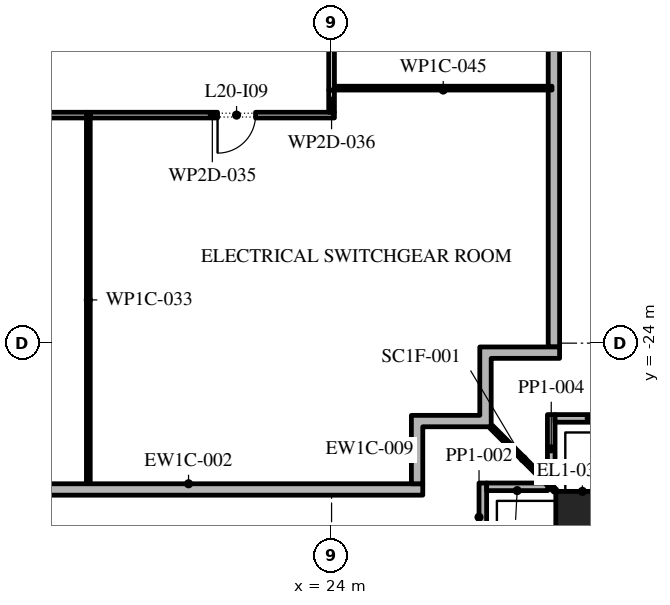
"""IFC4 building model, lengths in metres.
Left out: names, types, materials, properties, quantities, classifications, styles, units other than length and angle.
Written with IfcOpenShell. Run it as: python <this file> out.ifc"""

import sys

from ifc_helpers import new_model, si_unit, direction, frame, frame_2d, origin, origin_2d, place, context, subcontext, project, spatial, polyline, rectangle, outline, extrude, element, fill, save


model = new_model("IFC4")
c1 = context("Model", 3, precision=1e-05, world=origin(), true_north=direction((0.0, 1.0)))
c2 = subcontext(c1, "Body", "Model", "MODEL_VIEW")
j1 = project(units=[si_unit("LENGTHUNIT", "METRE"), si_unit("PLANEANGLEUNIT", "RADIAN")], contexts=[c1])
p1 = place(None, origin())
s1 = spatial("IfcSite", under=j1, at=p1, CompositionType="ELEMENT")
p2 = place(p1, origin())
s2 = spatial("IfcBuilding", under=s1, at=p2, CompositionType="ELEMENT")
p3 = place(p2, frame((0.0, 0.0, 94.2)))
s3 = spatial("IfcBuildingStorey", under=s2, at=p3, CompositionType="ELEMENT", Elevation=94.2)
p4 = place(p3, frame((30.6, -28.6, 0.0), z_axis=(0.0, 0.0, 1.0), x_axis=(1.0, 0.0, 0.0)))
e1 = element("IfcColumn", 1, at=p4, inside=s3, PredefinedType="COLUMN", context=c2, shape_type="SweptSolid", body=[
    extrude(rectangle(XDim=1.4, YDim=1.4, at=origin_2d()), origin(), (0.0, 0.0, 1.0), 5.4),
])
p5 = place(p3, frame((29.85, -24.1, 0.0), z_axis=(0.0, 0.0, 1.0), x_axis=(0.0, 1.0, 0.0)))
e2 = element("IfcWall", 2, at=p5, inside=s3, PredefinedType="STANDARD", context=c2, shape_type="SweptSolid", body=[
    extrude(rectangle(XDim=16.547, YDim=0.3, at=frame_2d((8.273, 0.0))), origin(), (0.0, 0.0, 1.0), 4.95),
])
p6 = place(p3, origin())
e3 = element("IfcWall", 3, at=p6, inside=s3, PredefinedType="STANDARD", context=c2, shape_type="SweptSolid", body=[
    extrude(outline(polyline([(27.9, -25.9), (27.9, -24.1), (30.0, -24.1), (30.0, -24.4), (28.2, -24.4), (28.2, -26.2), (26.4, -26.2), (26.4, -27.7), (26.1, -27.7), (26.1, -25.9), (27.9, -25.9)])), origin(), (0.0, 0.0, 1.0), 4.95),
])
p7 = place(p3, frame((27.98, -29.48, -0.05), z_axis=(0.0, 0.0, 1.0), x_axis=(0.0, 1.0, 0.0)))
e4 = element("IfcWall", 4, at=p7, inside=s3, PredefinedType="STANDARD", context=c2, shape_type="SweptSolid", body=[
    extrude(rectangle(XDim=1.8, YDim=0.2, at=frame_2d((0.9, 0.0))), origin(), (0.0, 0.0, 1.0), 1.1),
])
p8 = place(p3, frame((28.08, -27.78, -0.05), z_axis=(0.0, 0.0, 1.0), x_axis=(1.0, 0.0, 0.0)))
e5 = element("IfcWall", 5, at=p8, inside=s3, PredefinedType="STANDARD", context=c2, shape_type="SweptSolid", body=[
    extrude(rectangle(XDim=1.608, YDim=0.2, at=frame_2d((0.804, 0.0))), origin(), (0.0, 0.0, 1.0), 1.1),
])
for number, where, z_axis, x_axis in (
    (6, (29.78, -27.68, -0.05), (0.0, 0.0, 1.0), (0.0, 1.0, 0.0)),
    (7, (29.88, -25.98, -0.05), (0.0, 0.0, 1.0), (1.0, 0.0, 0.0)),
):
    element("IfcWall", number, at=place(p3, frame(where, z_axis=z_axis, x_axis=x_axis)), inside=s3, PredefinedType="STANDARD", context=c2, shape_type="SweptSolid", body=[
        extrude(rectangle(XDim=1.8, YDim=0.2, at=frame_2d((0.9, 0.0))), origin(), (0.0, 0.0, 1.0), 1.1),
    ])
p9 = place(p3, frame((28.2, -26.2, -0.05), z_axis=(0.0, 0.0, 1.0), x_axis=(0.707106781187, -0.707106781187, 0.0)))
e8 = element("IfcWall", 8, at=p9, inside=s3, PredefinedType="STANDARD", context=c2, shape_type="SweptSolid", body=[
    extrude(rectangle(XDim=2.385, YDim=0.1, at=frame_2d((1.192, 0.0))), origin(), (0.0, 0.0, 1.0), 5.0),
])
p10 = place(p3, frame((17.6, -27.8, 0.0), z_axis=(0.0, 0.0, 1.0), x_axis=(0.0, 1.0, 0.0)))
e9 = element("IfcWall", 9, at=p10, inside=s3, PredefinedType="PARTITIONING", context=c2, shape_type="SweptSolid", body=[
    extrude(rectangle(XDim=9.875, YDim=0.1, at=frame_2d((4.938, 0.0))), origin(), (0.0, 0.0, 1.0), 4.95),
])
p11 = place(p3, frame((17.55, -18.0, 0.0), z_axis=(0.0, 0.0, 1.0), x_axis=(-1.0, 0.0, 0.0)))
e10 = element("IfcWall", 10, at=p11, inside=s3, PredefinedType="PARTITIONING", context=c2, shape_type="SweptSolid", body=[
    extrude(rectangle(XDim=9.475, YDim=0.15, at=frame_2d((4.738, 0.0))), origin(), (0.0, 0.0, 1.0), 4.95),
])
p12 = place(p11, frame((3.4, 0.0, 0.0)))
e11 = element("IfcOpeningElement", 11, at=p12, cuts=e10, PredefinedType="OPENING", context=c2, shape_type="SweptSolid", body=[
    extrude(rectangle(XDim=1.0, YDim=2.1, at=frame_2d((0.5, 1.05))), frame((0.0, 0.085, 0.0), z_axis=(0.0, -1.0, 0.0), x_axis=(1.0, 0.0, 0.0)), (0.0, 0.0, 1.0), 0.17),
])
p13 = place(p3, frame((24.075, -18.0, 0.0), z_axis=(0.0, 0.0, 1.0), x_axis=(-1.0, 0.0, 0.0)))
e12 = element("IfcWall", 12, at=p13, inside=s3, PredefinedType="PARTITIONING", context=c2, shape_type="SweptSolid", body=[
    extrude(rectangle(XDim=6.425, YDim=0.15, at=frame_2d((3.212, 0.0))), origin(), (0.0, 0.0, 1.0), 4.95),
])
p14 = place(p13, frame((2.075, 0.0, 0.0)))
e13 = element("IfcOpeningElement", 13, at=p14, cuts=e12, PredefinedType="OPENING", context=c2, shape_type="SweptSolid", body=[
    extrude(rectangle(XDim=1.0, YDim=2.1, at=frame_2d((0.5, 1.05))), frame((0.0, 0.085, 0.0), z_axis=(0.0, -1.0, 0.0), x_axis=(1.0, 0.0, 0.0)), (0.0, 0.0, 1.0), 0.17),
])
p15 = place(p3, frame((24.0, -17.34, 0.0), z_axis=(0.0, 0.0, 1.0), x_axis=(0.0, -1.0, 0.0)))
e14 = element("IfcWall", 14, at=p15, inside=s3, PredefinedType="PARTITIONING", context=c2, shape_type="SweptSolid", body=[
    extrude(rectangle(XDim=0.585, YDim=0.15, at=frame_2d((0.292, 0.0))), origin(), (0.0, 0.0, 1.0), 4.95),
])
p16 = place(p3, frame((24.0, -10.12, 0.0), z_axis=(0.0, 0.0, 1.0), x_axis=(0.0, -1.0, 0.0)))
e15 = element("IfcWall", 15, at=p16, inside=s3, PredefinedType="PARTITIONING", context=c2, shape_type="SweptSolid", body=[
    extrude(rectangle(XDim=7.22, YDim=0.15, at=frame_2d((3.61, 0.0))), origin(), (0.0, 0.0, 1.0), 4.95),
])
p17 = place(p16, frame((4.52, 0.0, 0.0)))
e16 = element("IfcOpeningElement", 16, at=p17, cuts=e15, PredefinedType="OPENING", context=c2, shape_type="SweptSolid", body=[
    extrude(rectangle(XDim=1.0, YDim=2.1, at=frame_2d((0.5, 1.05))), frame((0.0, 0.085, 0.0), z_axis=(0.0, -1.0, 0.0), x_axis=(1.0, 0.0, 0.0)), (0.0, 0.0, 1.0), 0.17),
])
p18 = place(p3, frame((29.8, -17.29, 0.0), z_axis=(0.0, 0.0, 1.0), x_axis=(-1.0, 0.0, 0.0)))
e17 = element("IfcWall", 17, at=p18, inside=s3, PredefinedType="PARTITIONING", context=c2, shape_type="SweptSolid", body=[
    extrude(rectangle(XDim=5.725, YDim=0.1, at=frame_2d((2.863, 0.0))), origin(), (0.0, 0.0, 1.0), 4.95),
])
p19 = place(p3, frame((14.073, -27.85, 0.0), z_axis=(0.0, 0.0, 1.0), x_axis=(1.0, 0.0, 0.0)))
e18 = element("IfcWall", 18, at=p19, inside=s3, PredefinedType="STANDARD", context=c2, shape_type="SweptSolid", body=[
    extrude(rectangle(XDim=12.327, YDim=0.3, at=frame_2d((6.163, 0.0))), origin(), (0.0, 0.0, 1.0), 4.95),
])
p20 = place(p14, origin())
e19 = element("IfcDoor", 19, at=p20, inside=s3, OperationType="SINGLE_SWING_LEFT", PredefinedType="DOOR", context=c2, shape_type="SweptSolid", body=[
    extrude(rectangle(XDim=1.0, YDim=2.1, at=frame_2d((0.5, 1.05))), frame((0.0, 0.025, 0.0), z_axis=(0.0, -1.0, 0.0), x_axis=(1.0, 0.0, 0.0)), (0.0, 0.0, 1.0), 0.05),
])
fill(e13, e19)
save(model, sys.argv[1])
